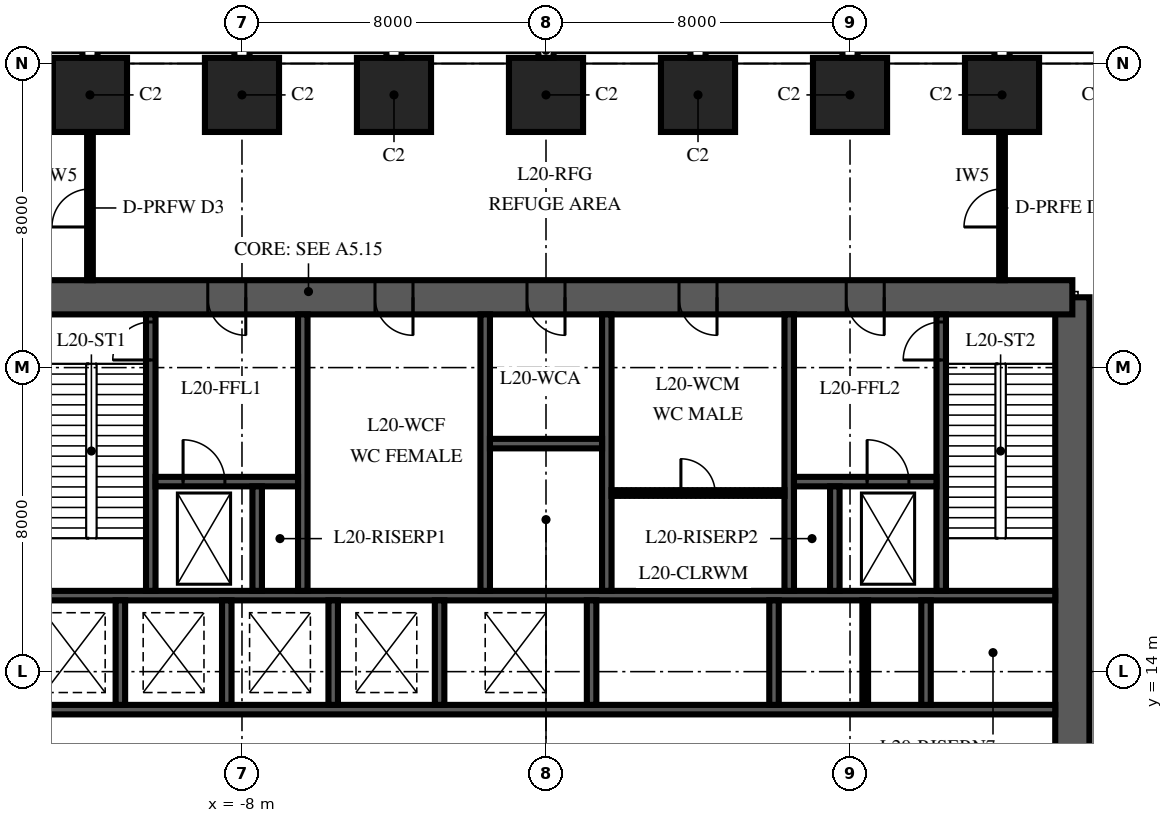
"""IFC4 building model, lengths in metres.
Left out: names, types, materials, properties, quantities, classifications, styles, units other than length and angle.
Written with IfcOpenShell. Run it as: python <this file> out.ifc"""

import sys

from ifc_helpers import new_model, si_unit, direction, frame, frame_2d, origin, origin_2d, place, context, subcontext, project, spatial, polyline, rectangle, outline, extrude, element, fill, save


model = new_model("IFC4")
c1 = context("Model", 3, precision=1e-05, world=origin(), true_north=direction((0.0, 1.0)))
c2 = subcontext(c1, "Body", "Model", "MODEL_VIEW")
j1 = project(units=[si_unit("LENGTHUNIT", "METRE"), si_unit("PLANEANGLEUNIT", "RADIAN")], contexts=[c1])
p1 = place(None, origin())
s1 = spatial("IfcSite", under=j1, at=p1, CompositionType="ELEMENT")
p2 = place(p1, origin())
s2 = spatial("IfcBuilding", under=s1, at=p2, CompositionType="ELEMENT")
p3 = place(p2, frame((0.0, 0.0, 92.0)))
s3 = spatial("IfcBuildingStorey", under=s2, at=p3, CompositionType="ELEMENT", Elevation=92.0)
for number, where, z_axis, x_axis in (
    (1, (12.0, 29.175, 0.0), (0.0, 0.0, 1.0), (-1.0, 0.0, 0.0)),
    (2, (8.0, 29.175, 0.0), (0.0, 0.0, 1.0), (-1.0, 0.0, 0.0)),
    (3, (4.0, 29.175, 0.0), (0.0, 0.0, 1.0), (-1.0, 0.0, 0.0)),
    (4, (0.0, 29.175, 0.0), (0.0, 0.0, 1.0), (-1.0, 0.0, 0.0)),
    (5, (-4.0, 29.175, 0.0), (0.0, 0.0, 1.0), (-1.0, 0.0, 0.0)),
    (6, (-8.0, 29.175, 0.0), (0.0, 0.0, 1.0), (-1.0, 0.0, 0.0)),
    (7, (-12.0, 29.175, 0.0), (0.0, 0.0, 1.0), (-1.0, 0.0, 0.0)),
):
    element("IfcColumn", number, at=place(p3, frame(where, z_axis=z_axis, x_axis=x_axis)), inside=s3, PredefinedType="COLUMN", context=c2, shape_type="SweptSolid", body=[
        extrude(rectangle(XDim=1.95, YDim=1.95, at=origin_2d()), origin(), (0.0, 0.0, 1.0), 6.0),
    ])
p4 = place(p3, frame((13.85, 6.15, 0.0), z_axis=(0.0, 0.0, 1.0), x_axis=(0.0, 1.0, 0.0)))
e8 = element("IfcWall", 8, at=p4, inside=s3, PredefinedType="SHEAR", context=c2, shape_type="SweptSolid", body=[
    extrude(outline(polyline([(0.0, -0.45), (17.7, -0.45), (17.7, 0.0), (17.25, 0.0), (17.25, 0.45), (0.45, 0.45), (0.45, 0.0), (0.0, 0.0), (0.0, -0.45)])), origin(), (0.0, 0.0, 1.0), 6.0),
])
p5 = place(p3, frame((13.85, 23.85, 0.0), z_axis=(0.0, 0.0, 1.0), x_axis=(-1.0, 0.0, 0.0)))
e9 = element("IfcWall", 9, at=p5, inside=s3, PredefinedType="SHEAR", context=c2, shape_type="SweptSolid", body=[
    extrude(rectangle(XDim=27.7, YDim=0.9, at=frame_2d((13.85, 0.0))), origin(), (0.0, 0.0, 1.0), 6.0),
])
p6 = place(p5, frame((21.75, 0.0, 0.0)))
e10 = element("IfcOpeningElement", 10, at=p6, cuts=e9, PredefinedType="OPENING", context=c2, shape_type="SweptSolid", body=[
    extrude(rectangle(XDim=1.0, YDim=2.1, at=frame_2d((0.5, 1.05))), frame((0.0, 0.465, 0.0), z_axis=(0.0, -1.0, 0.0), x_axis=(1.0, 0.0, 0.0)), (0.0, 0.0, 1.0), 0.93),
])
p7 = place(p5, frame((4.95, 0.0, 0.0)))
e11 = element("IfcOpeningElement", 11, at=p7, cuts=e9, PredefinedType="OPENING", context=c2, shape_type="SweptSolid", body=[
    extrude(rectangle(XDim=1.0, YDim=2.1, at=frame_2d((0.5, 1.05))), frame((0.0, 0.465, 0.0), z_axis=(0.0, -1.0, 0.0), x_axis=(1.0, 0.0, 0.0)), (0.0, 0.0, 1.0), 0.93),
])
p8 = place(p5, frame((17.35, 0.0, 0.0)))
e12 = element("IfcOpeningElement", 12, at=p8, cuts=e9, PredefinedType="OPENING", context=c2, shape_type="SweptSolid", body=[
    extrude(rectangle(XDim=1.0, YDim=2.1, at=frame_2d((0.5, 1.05))), frame((0.0, 0.465, 0.0), z_axis=(0.0, -1.0, 0.0), x_axis=(1.0, 0.0, 0.0)), (0.0, 0.0, 1.0), 0.93),
])
p9 = place(p5, frame((13.35, 0.0, 0.0)))
e13 = element("IfcOpeningElement", 13, at=p9, cuts=e9, PredefinedType="OPENING", context=c2, shape_type="SweptSolid", body=[
    extrude(rectangle(XDim=1.0, YDim=2.1, at=frame_2d((0.5, 1.05))), frame((0.0, 0.465, 0.0), z_axis=(0.0, -1.0, 0.0), x_axis=(1.0, 0.0, 0.0)), (0.0, 0.0, 1.0), 0.93),
])
p10 = place(p5, frame((9.35, 0.0, 0.0)))
e14 = element("IfcOpeningElement", 14, at=p10, cuts=e9, PredefinedType="OPENING", context=c2, shape_type="SweptSolid", body=[
    extrude(rectangle(XDim=1.0, YDim=2.1, at=frame_2d((0.5, 1.05))), frame((0.0, 0.465, 0.0), z_axis=(0.0, -1.0, 0.0), x_axis=(1.0, 0.0, 0.0)), (0.0, 0.0, 1.0), 0.93),
])
for number, where, z_axis, x_axis in (
    (15, (-13.4, 13.0, 0.0), (0.0, 0.0, 1.0), (1.0, 0.0, 0.0)),
    (16, (-13.4, 16.0, 0.0), (0.0, 0.0, 1.0), (1.0, 0.0, 0.0)),
):
    element("IfcWall", number, at=place(p3, frame(where, z_axis=z_axis, x_axis=x_axis)), inside=s3, PredefinedType="SHEAR", context=c2, shape_type="SweptSolid", body=[
        extrude(rectangle(XDim=26.8, YDim=0.25, at=frame_2d((13.4, 0.0))), origin(), (0.0, 0.0, 1.0), 6.0),
    ])
for number, where, z_axis, x_axis in (
    (17, (-11.2, 13.125, 0.0), (0.0, 0.0, 1.0), (0.0, 1.0, 0.0)),
    (18, (-8.4, 13.125, 0.0), (0.0, 0.0, 1.0), (0.0, 1.0, 0.0)),
    (19, (-5.6, 13.125, 0.0), (0.0, 0.0, 1.0), (0.0, 1.0, 0.0)),
    (20, (-2.8, 13.125, 0.0), (0.0, 0.0, 1.0), (0.0, 1.0, 0.0)),
    (21, (1.2, 13.125, 0.0), (0.0, 0.0, 1.0), (0.0, 1.0, 0.0)),
    (22, (6.0, 13.125, 0.0), (0.0, 0.0, 1.0), (0.0, 1.0, 0.0)),
    (23, (10.0, 13.125, 0.0), (0.0, 0.0, 1.0), (0.0, 1.0, 0.0)),
):
    element("IfcWall", number, at=place(p3, frame(where, z_axis=z_axis, x_axis=x_axis)), inside=s3, PredefinedType="SHEAR", context=c2, shape_type="SweptSolid", body=[
        extrude(rectangle(XDim=2.75, YDim=0.25, at=frame_2d((1.375, 0.0))), origin(), (0.0, 0.0, 1.0), 6.0),
    ])
p11 = place(p3, frame((-10.4, 16.125, 0.0), z_axis=(0.0, 0.0, 1.0), x_axis=(0.0, 1.0, 0.0)))
e24 = element("IfcWall", 24, at=p11, inside=s3, PredefinedType="SHEAR", context=c2, shape_type="SweptSolid", body=[
    extrude(rectangle(XDim=7.275, YDim=0.25, at=frame_2d((3.637, 0.0))), origin(), (0.0, 0.0, 1.0), 6.0),
])
p12 = place(p11, frame((6.075, 0.0, 0.0)))
e25 = element("IfcOpeningElement", 25, at=p12, cuts=e24, PredefinedType="OPENING", context=c2, shape_type="SweptSolid", body=[
    extrude(rectangle(XDim=1.0, YDim=2.1, at=frame_2d((0.5, 1.05))), frame((0.0, 0.14, 0.0), z_axis=(0.0, -1.0, 0.0), x_axis=(1.0, 0.0, 0.0)), (0.0, 0.0, 1.0), 0.28),
])
for number, where, z_axis, x_axis in (
    (26, (-6.4, 16.125, 0.0), (0.0, 0.0, 1.0), (0.0, 1.0, 0.0)),
    (27, (-1.6, 16.125, 0.0), (0.0, 0.0, 1.0), (0.0, 1.0, 0.0)),
    (28, (1.6, 16.125, 0.0), (0.0, 0.0, 1.0), (0.0, 1.0, 0.0)),
    (29, (6.4, 16.125, 0.0), (0.0, 0.0, 1.0), (0.0, 1.0, 0.0)),
):
    element("IfcWall", number, at=place(p3, frame(where, z_axis=z_axis, x_axis=x_axis)), inside=s3, PredefinedType="SHEAR", context=c2, shape_type="SweptSolid", body=[
        extrude(rectangle(XDim=7.275, YDim=0.25, at=frame_2d((3.637, 0.0))), origin(), (0.0, 0.0, 1.0), 6.0),
    ])
p13 = place(p3, frame((10.4, 16.125, 0.0), z_axis=(0.0, 0.0, 1.0), x_axis=(0.0, 1.0, 0.0)))
e30 = element("IfcWall", 30, at=p13, inside=s3, PredefinedType="SHEAR", context=c2, shape_type="SweptSolid", body=[
    extrude(rectangle(XDim=7.275, YDim=0.25, at=frame_2d((3.637, 0.0))), origin(), (0.0, 0.0, 1.0), 6.0),
])
p14 = place(p13, frame((6.075, 0.0, 0.0)))
e31 = element("IfcOpeningElement", 31, at=p14, cuts=e30, PredefinedType="OPENING", context=c2, shape_type="SweptSolid", body=[
    extrude(rectangle(XDim=1.0, YDim=2.1, at=frame_2d((0.5, 1.05))), frame((0.0, 0.14, 0.0), z_axis=(0.0, -1.0, 0.0), x_axis=(1.0, 0.0, 0.0)), (0.0, 0.0, 1.0), 0.28),
])
p15 = place(p3, frame((-10.275, 19.0, 0.0), z_axis=(0.0, 0.0, 1.0), x_axis=(1.0, 0.0, 0.0)))
e32 = element("IfcWall", 32, at=p15, inside=s3, PredefinedType="SHEAR", context=c2, shape_type="SweptSolid", body=[
    extrude(rectangle(XDim=3.75, YDim=0.25, at=frame_2d((1.875, 0.0))), origin(), (0.0, 0.0, 1.0), 6.0),
])
p16 = place(p15, frame((0.725, 0.0, 0.0)))
e33 = element("IfcOpeningElement", 33, at=p16, cuts=e32, PredefinedType="OPENING", context=c2, shape_type="SweptSolid", body=[
    extrude(rectangle(XDim=1.1, YDim=2.1, at=frame_2d((0.55, 1.05))), frame((0.0, 0.14, 0.0), z_axis=(0.0, -1.0, 0.0), x_axis=(1.0, 0.0, 0.0)), (0.0, 0.0, 1.0), 0.28),
])
p17 = place(p3, frame((6.525, 19.0, 0.0), z_axis=(0.0, 0.0, 1.0), x_axis=(1.0, 0.0, 0.0)))
e34 = element("IfcWall", 34, at=p17, inside=s3, PredefinedType="SHEAR", context=c2, shape_type="SweptSolid", body=[
    extrude(rectangle(XDim=3.75, YDim=0.25, at=frame_2d((1.875, 0.0))), origin(), (0.0, 0.0, 1.0), 6.0),
])
p18 = place(p17, frame((1.925, 0.0, 0.0)))
e35 = element("IfcOpeningElement", 35, at=p18, cuts=e34, PredefinedType="OPENING", context=c2, shape_type="SweptSolid", body=[
    extrude(rectangle(XDim=1.1, YDim=2.1, at=frame_2d((0.55, 1.05))), frame((0.0, 0.14, 0.0), z_axis=(0.0, -1.0, 0.0), x_axis=(1.0, 0.0, 0.0)), (0.0, 0.0, 1.0), 0.28),
])
for number, where, z_axis, x_axis in (
    (36, (-7.6, 16.125, 0.0), (0.0, 0.0, 1.0), (0.0, 1.0, 0.0)),
    (37, (7.6, 16.125, 0.0), (0.0, 0.0, 1.0), (0.0, 1.0, 0.0)),
):
    element("IfcWall", number, at=place(p3, frame(where, z_axis=z_axis, x_axis=x_axis)), inside=s3, PredefinedType="SHEAR", context=c2, shape_type="SweptSolid", body=[
        extrude(rectangle(XDim=2.75, YDim=0.25, at=frame_2d((1.375, 0.0))), origin(), (0.0, 0.0, 1.0), 6.0),
    ])
p19 = place(p3, frame((-1.475, 20.0, 0.0), z_axis=(0.0, 0.0, 1.0), x_axis=(1.0, 0.0, 0.0)))
e38 = element("IfcWall", 38, at=p19, inside=s3, PredefinedType="SHEAR", context=c2, shape_type="SweptSolid", body=[
    extrude(rectangle(XDim=2.95, YDim=0.25, at=frame_2d((1.475, 0.0))), origin(), (0.0, 0.0, 1.0), 6.0),
])
p20 = place(p3, frame((1.725, 18.7, 0.0), z_axis=(0.0, 0.0, 1.0), x_axis=(1.0, 0.0, 0.0)))
e39 = element("IfcWall", 39, at=p20, inside=s3, PredefinedType="PARTITIONING", context=c2, shape_type="SweptSolid", body=[
    extrude(rectangle(XDim=4.55, YDim=0.15, at=frame_2d((2.275, 0.0))), origin(), (0.0, 0.0, 1.0), 5.85),
])
p21 = place(p20, frame((1.825, 0.0, 0.0)))
e40 = element("IfcOpeningElement", 40, at=p21, cuts=e39, PredefinedType="OPENING", context=c2, shape_type="SweptSolid", body=[
    extrude(rectangle(XDim=0.9, YDim=2.1, at=frame_2d((0.45, 1.05))), frame((0.0, 0.09, 0.0), z_axis=(0.0, -1.0, 0.0), x_axis=(1.0, 0.0, 0.0)), (0.0, 0.0, 1.0), 0.18),
])
p22 = place(p3, frame((8.4, 13.125, 0.0), z_axis=(0.0, 0.0, 1.0), x_axis=(0.0, 1.0, 0.0)))
e41 = element("IfcWall", 41, at=p22, inside=s3, PredefinedType="PARTITIONING", context=c2, shape_type="SweptSolid", body=[
    extrude(rectangle(XDim=2.75, YDim=0.15, at=frame_2d((1.375, 0.0))), origin(), (0.0, 0.0, 1.0), 5.85),
])
p23 = place(p3, frame((12.0, 24.3, 0.0), z_axis=(0.0, 0.0, 1.0), x_axis=(0.0, 1.0, 0.0)))
e42 = element("IfcWall", 42, at=p23, inside=s3, PredefinedType="PARTITIONING", context=c2, shape_type="SweptSolid", body=[
    extrude(rectangle(XDim=3.92, YDim=0.15, at=frame_2d((1.96, 0.0))), origin(), (0.0, 0.0, 1.0), 5.8),
])
p24 = place(p23, frame((1.4, 0.0, 0.0)))
e43 = element("IfcOpeningElement", 43, at=p24, cuts=e42, PredefinedType="OPENING", context=c2, shape_type="SweptSolid", body=[
    extrude(rectangle(XDim=1.0, YDim=2.1, at=frame_2d((0.5, 1.05))), frame((0.0, 0.09, 0.0), z_axis=(0.0, -1.0, 0.0), x_axis=(1.0, 0.0, 0.0)), (0.0, 0.0, 1.0), 0.18),
])
p25 = place(p3, frame((-12.0, 24.3, 0.0), z_axis=(0.0, 0.0, 1.0), x_axis=(0.0, 1.0, 0.0)))
e44 = element("IfcWall", 44, at=p25, inside=s3, PredefinedType="PARTITIONING", context=c2, shape_type="SweptSolid", body=[
    extrude(rectangle(XDim=3.92, YDim=0.15, at=frame_2d((1.96, 0.0))), origin(), (0.0, 0.0, 1.0), 5.8),
])
p26 = place(p25, frame((1.4, 0.0, 0.0)))
e45 = element("IfcOpeningElement", 45, at=p26, cuts=e44, PredefinedType="OPENING", context=c2, shape_type="SweptSolid", body=[
    extrude(rectangle(XDim=1.0, YDim=2.1, at=frame_2d((0.5, 1.05))), frame((0.0, 0.09, 0.0), z_axis=(0.0, -1.0, 0.0), x_axis=(1.0, 0.0, 0.0)), (0.0, 0.0, 1.0), 0.18),
])
p27 = place(p6, origin())
e46 = element("IfcDoor", 46, at=p27, inside=s3, OperationType="SINGLE_SWING_RIGHT", PredefinedType="DOOR", context=c2, shape_type="SweptSolid", body=[
    extrude(rectangle(XDim=1.0, YDim=2.1, at=frame_2d((0.5, 1.05))), frame((0.0, 0.45, 0.0), z_axis=(0.0, -1.0, 0.0), x_axis=(1.0, 0.0, 0.0)), (0.0, 0.0, 1.0), 0.899),
])
fill(e10, e46)
p28 = place(p7, origin())
e47 = element("IfcDoor", 47, at=p28, inside=s3, OperationType="SINGLE_SWING_RIGHT", PredefinedType="DOOR", context=c2, shape_type="SweptSolid", body=[
    extrude(rectangle(XDim=1.0, YDim=2.1, at=frame_2d((0.5, 1.05))), frame((0.0, 0.45, 0.0), z_axis=(0.0, -1.0, 0.0), x_axis=(1.0, 0.0, 0.0)), (0.0, 0.0, 1.0), 0.899),
])
fill(e11, e47)
p29 = place(p8, origin())
e48 = element("IfcDoor", 48, at=p29, inside=s3, OperationType="SINGLE_SWING_LEFT", PredefinedType="DOOR", context=c2, shape_type="SweptSolid", body=[
    extrude(rectangle(XDim=1.0, YDim=2.1, at=frame_2d((0.5, 1.05))), frame((0.0, 0.45, 0.0), z_axis=(0.0, -1.0, 0.0), x_axis=(1.0, 0.0, 0.0)), (0.0, 0.0, 1.0), 0.899),
])
fill(e12, e48)
p30 = place(p9, origin())
e49 = element("IfcDoor", 49, at=p30, inside=s3, OperationType="SINGLE_SWING_LEFT", PredefinedType="DOOR", context=c2, shape_type="SweptSolid", body=[
    extrude(rectangle(XDim=1.0, YDim=2.1, at=frame_2d((0.5, 1.05))), frame((0.0, 0.45, 0.0), z_axis=(0.0, -1.0, 0.0), x_axis=(1.0, 0.0, 0.0)), (0.0, 0.0, 1.0), 0.899),
])
fill(e13, e49)
p31 = place(p10, origin())
e50 = element("IfcDoor", 50, at=p31, inside=s3, OperationType="SINGLE_SWING_LEFT", PredefinedType="DOOR", context=c2, shape_type="SweptSolid", body=[
    extrude(rectangle(XDim=1.0, YDim=2.1, at=frame_2d((0.5, 1.05))), frame((0.0, 0.45, 0.0), z_axis=(0.0, -1.0, 0.0), x_axis=(1.0, 0.0, 0.0)), (0.0, 0.0, 1.0), 0.899),
])
fill(e14, e50)
p32 = place(p12, origin())
e51 = element("IfcDoor", 51, at=p32, inside=s3, OperationType="SINGLE_SWING_LEFT", PredefinedType="DOOR", context=c2, shape_type="SweptSolid", body=[
    extrude(rectangle(XDim=1.0, YDim=2.1, at=frame_2d((0.5, 1.05))), frame((0.0, 0.125, 0.0), z_axis=(0.0, -1.0, 0.0), x_axis=(1.0, 0.0, 0.0)), (0.0, 0.0, 1.0), 0.25),
])
fill(e25, e51)
p33 = place(p14, origin())
e52 = element("IfcDoor", 52, at=p33, inside=s3, OperationType="SINGLE_SWING_LEFT", PredefinedType="DOOR", context=c2, shape_type="SweptSolid", body=[
    extrude(rectangle(XDim=1.0, YDim=2.1, at=frame_2d((0.5, 1.05))), frame((0.0, 0.125, 0.0), z_axis=(0.0, -1.0, 0.0), x_axis=(1.0, 0.0, 0.0)), (0.0, 0.0, 1.0), 0.25),
])
fill(e31, e52)
p34 = place(p18, origin())
e53 = element("IfcDoor", 53, at=p34, inside=s3, OperationType="SLIDING_TO_RIGHT", PredefinedType="DOOR", context=c2, shape_type="SweptSolid", body=[
    extrude(rectangle(XDim=1.1, YDim=2.1, at=frame_2d((0.55, 1.05))), frame((0.0, 0.125, 0.0), z_axis=(0.0, -1.0, 0.0), x_axis=(1.0, 0.0, 0.0)), (0.0, 0.0, 1.0), 0.25),
])
fill(e35, e53)
p35 = place(p16, origin())
e54 = element("IfcDoor", 54, at=p35, inside=s3, OperationType="SLIDING_TO_RIGHT", PredefinedType="DOOR", context=c2, shape_type="SweptSolid", body=[
    extrude(rectangle(XDim=1.1, YDim=2.1, at=frame_2d((0.55, 1.05))), frame((0.0, 0.125, 0.0), z_axis=(0.0, -1.0, 0.0), x_axis=(1.0, 0.0, 0.0)), (0.0, 0.0, 1.0), 0.25),
])
fill(e33, e54)
p36 = place(p21, origin())
e55 = element("IfcDoor", 55, at=p36, inside=s3, OperationType="SINGLE_SWING_LEFT", PredefinedType="DOOR", context=c2, shape_type="SweptSolid", body=[
    extrude(rectangle(XDim=0.9, YDim=2.1, at=frame_2d((0.45, 1.05))), frame((0.0, 0.075, 0.0), z_axis=(0.0, -1.0, 0.0), x_axis=(1.0, 0.0, 0.0)), (0.0, 0.0, 1.0), 0.149),
])
fill(e40, e55)
p37 = place(p24, origin())
e56 = element("IfcDoor", 56, at=p37, inside=s3, OperationType="SINGLE_SWING_RIGHT", PredefinedType="DOOR", context=c2, shape_type="SweptSolid", body=[
    extrude(rectangle(XDim=1.0, YDim=2.1, at=frame_2d((0.5, 1.05))), frame((0.0, 0.075, 0.0), z_axis=(0.0, -1.0, 0.0), x_axis=(1.0, 0.0, 0.0)), (0.0, 0.0, 1.0), 0.149),
])
fill(e43, e56)
p38 = place(p26, origin())
e57 = element("IfcDoor", 57, at=p38, inside=s3, OperationType="SINGLE_SWING_RIGHT", PredefinedType="DOOR", context=c2, shape_type="SweptSolid", body=[
    extrude(rectangle(XDim=1.0, YDim=2.1, at=frame_2d((0.5, 1.05))), frame((0.0, 0.075, 0.0), z_axis=(0.0, -1.0, 0.0), x_axis=(1.0, 0.0, 0.0)), (0.0, 0.0, 1.0), 0.149),
])
fill(e45, e57)
save(model, sys.argv[1])
